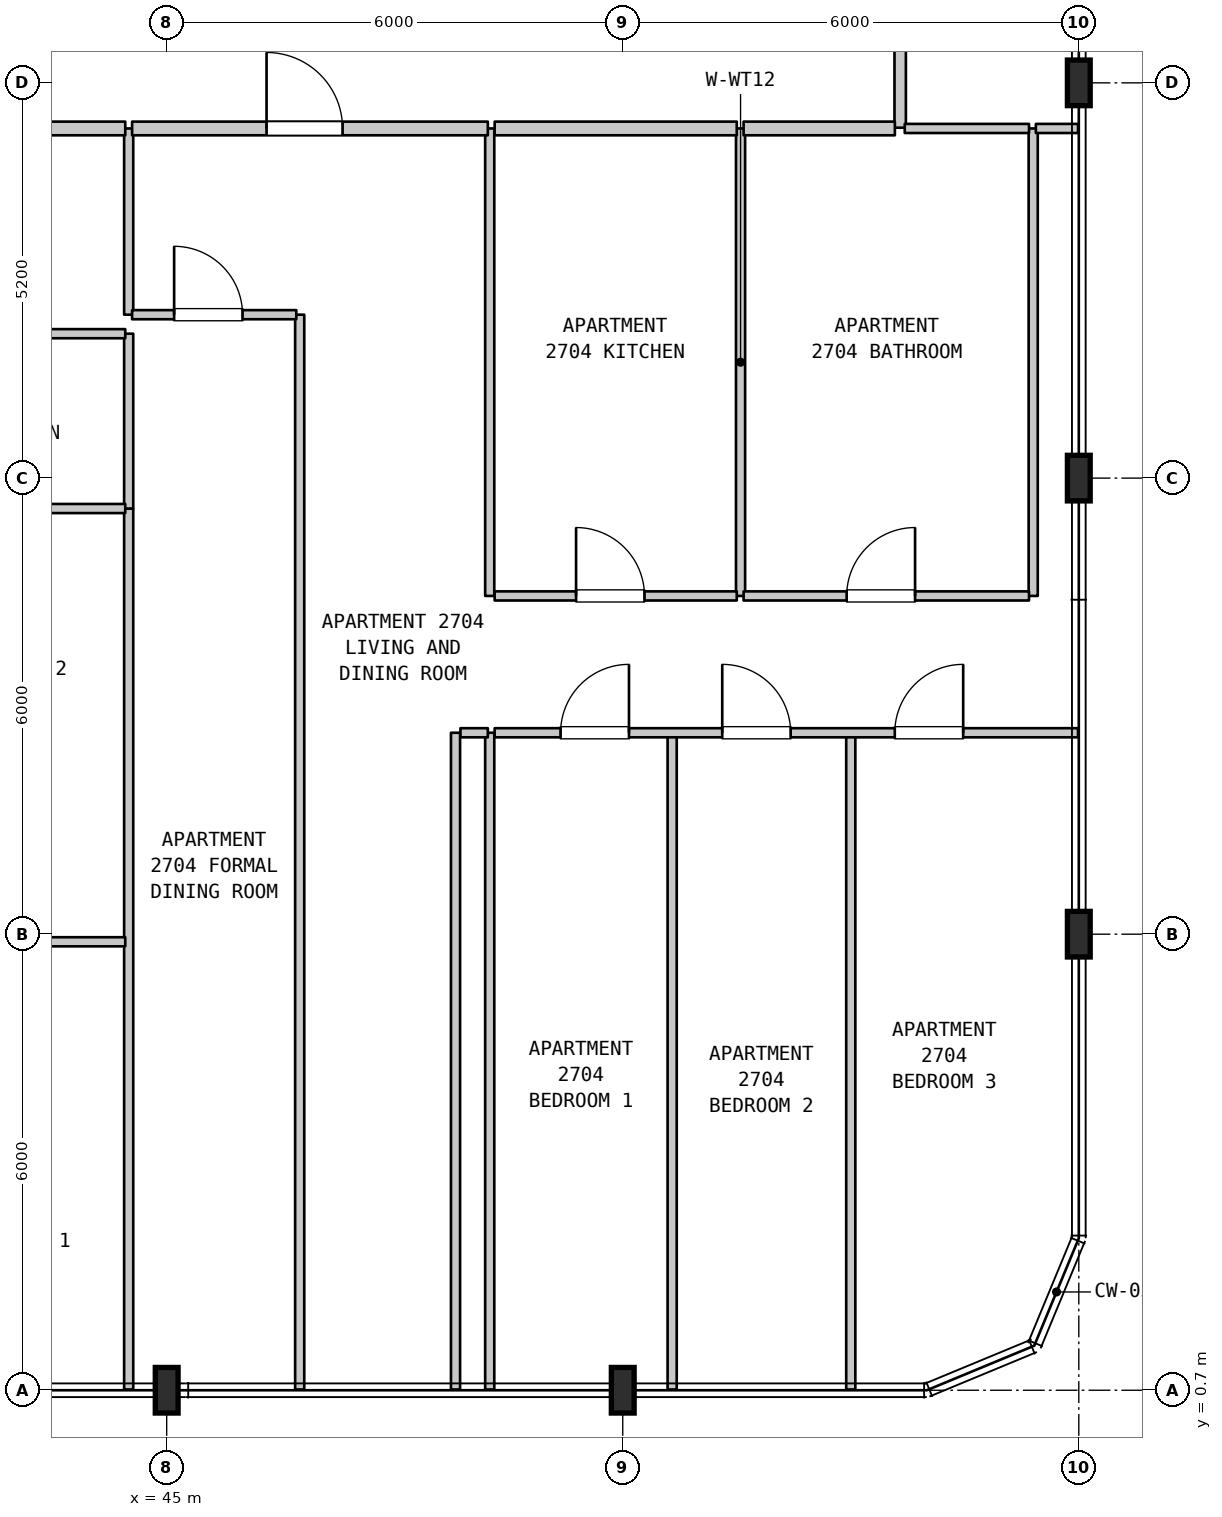
"""IFC4 building model, lengths in metres.
Left out: names, types, materials, properties, quantities, classifications, styles, units other than length and angle.
Written with IfcOpenShell. Run it as: python <this file> out.ifc"""

import sys

from ifc_helpers import new_model, si_unit, direction, frame, frame_2d, origin, origin_2d, place, context, subcontext, project, spatial, rectangle, i_section, extrude, element, fill, save


model = new_model("IFC4")
c1 = context("Model", 3, precision=1e-05, world=origin(), true_north=direction((0.0, 1.0)))
c2 = subcontext(c1, "Body", "Model", "MODEL_VIEW")
j1 = project(units=[si_unit("LENGTHUNIT", "METRE"), si_unit("PLANEANGLEUNIT", "RADIAN")], contexts=[c1])
p1 = place(None, origin())
s1 = spatial("IfcSite", under=j1, at=p1, CompositionType="ELEMENT")
p2 = place(p1, origin())
s2 = spatial("IfcBuilding", under=s1, at=p2, CompositionType="ELEMENT")
p3 = place(p2, frame((0.0, 0.0, 113.1)))
s3 = spatial("IfcBuildingStorey", under=s2, at=p3, CompositionType="ELEMENT", Elevation=113.1)
for number, where, z_axis, x_axis in (
    (1, (45.0, 0.7, 0.0), (0.0, 0.0, 1.0), (1.0, 0.0, 0.0)),
    (2, (51.0, 0.7, 0.0), (0.0, 0.0, 1.0), (1.0, 0.0, 0.0)),
    (3, (57.0, 6.7, 0.0), (0.0, 0.0, 1.0), (1.0, 0.0, 0.0)),
    (4, (57.0, 12.7, 0.0), (0.0, 0.0, 1.0), (1.0, 0.0, 0.0)),
    (5, (57.0, 17.9, 0.0), (0.0, 0.0, 1.0), (1.0, 0.0, 0.0)),
):
    element("IfcColumn", number, at=place(p3, frame(where, z_axis=z_axis, x_axis=x_axis)), inside=s3, PredefinedType="COLUMN", context=c2, shape_type="SweptSolid", body=[
        extrude(i_section(OverallWidth=0.3, OverallDepth=0.6, WebThickness=0.015, FlangeThickness=0.03, FilletRadius=0.027, at=origin_2d()), origin(), (0.0, 0.0, 1.0), 3.7),
    ])
p4 = place(p3, frame((44.5, 0.71, 0.0), z_axis=(0.0, 0.0, 1.0), x_axis=(0.0, 1.0, 0.0)))
e6 = element("IfcWall", 6, at=p4, inside=s3, PredefinedType="PARTITIONING", context=c2, shape_type="SweptSolid", body=[
    extrude(rectangle(XDim=11.59, YDim=0.12, at=frame_2d((5.795, 0.0))), origin(), (0.0, 0.0, 1.0), 3.385),
])
p5 = place(p3, frame((44.5, 12.3, 0.0), z_axis=(0.0, 0.0, 1.0), x_axis=(0.0, 1.0, 0.0)))
e7 = element("IfcWall", 7, at=p5, inside=s3, PredefinedType="PARTITIONING", context=c2, shape_type="SweptSolid", body=[
    extrude(rectangle(XDim=2.3, YDim=0.12, at=frame_2d((1.15, 0.0))), origin(), (0.0, 0.0, 1.0), 3.385),
])
p6 = place(p3, frame((44.5, 14.85, 0.0), z_axis=(0.0, 0.0, 1.0), x_axis=(0.0, 1.0, 0.0)))
e8 = element("IfcWall", 8, at=p6, inside=s3, PredefinedType="PARTITIONING", context=c2, shape_type="SweptSolid", body=[
    extrude(rectangle(XDim=2.45, YDim=0.12, at=frame_2d((1.225, 0.0))), origin(), (0.0, 0.0, 1.0), 3.385),
])
p7 = place(p3, frame((46.75, 0.71, 0.0), z_axis=(0.0, 0.0, 1.0), x_axis=(0.0, 1.0, 0.0)))
e9 = element("IfcWall", 9, at=p7, inside=s3, PredefinedType="PARTITIONING", context=c2, shape_type="SweptSolid", body=[
    extrude(rectangle(XDim=14.14, YDim=0.12, at=frame_2d((7.07, 0.0))), origin(), (0.0, 0.0, 1.0), 3.385),
])
for number, where, z_axis, x_axis in (
    (10, (48.8, 0.71, 0.0), (0.0, 0.0, 1.0), (0.0, 1.0, 0.0)),
    (11, (49.25, 0.71, 0.0), (0.0, 0.0, 1.0), (0.0, 1.0, 0.0)),
):
    element("IfcWall", number, at=place(p3, frame(where, z_axis=z_axis, x_axis=x_axis)), inside=s3, PredefinedType="PARTITIONING", context=c2, shape_type="SweptSolid", body=[
        extrude(rectangle(XDim=8.64, YDim=0.12, at=frame_2d((4.32, 0.0))), origin(), (0.0, 0.0, 1.0), 3.385),
    ])
p8 = place(p3, frame((49.25, 11.15, 0.0), z_axis=(0.0, 0.0, 1.0), x_axis=(0.0, 1.0, 0.0)))
e12 = element("IfcWall", 12, at=p8, inside=s3, PredefinedType="PARTITIONING", context=c2, shape_type="SweptSolid", body=[
    extrude(rectangle(XDim=6.15, YDim=0.12, at=frame_2d((3.075, 0.0))), origin(), (0.0, 0.0, 1.0), 3.385),
])
p9 = place(p3, frame((51.65, 0.71, 0.0), z_axis=(0.0, 0.0, 1.0), x_axis=(0.0, 1.0, 0.0)))
e13 = element("IfcWall", 13, at=p9, inside=s3, PredefinedType="PARTITIONING", context=c2, shape_type="SweptSolid", body=[
    extrude(rectangle(XDim=8.64, YDim=0.12, at=frame_2d((4.32, 0.0))), origin(), (0.0, 0.0, 1.0), 3.385),
])
p10 = place(p3, frame((52.55, 11.15, 0.0), z_axis=(0.0, 0.0, 1.0), x_axis=(0.0, 1.0, 0.0)))
e14 = element("IfcWall", 14, at=p10, inside=s3, PredefinedType="PARTITIONING", context=c2, shape_type="SweptSolid", body=[
    extrude(rectangle(XDim=6.15, YDim=0.12, at=frame_2d((3.075, 0.0))), origin(), (0.0, 0.0, 1.0), 3.385),
])
p11 = place(p3, frame((54.0, 0.71, 0.0), z_axis=(0.0, 0.0, 1.0), x_axis=(0.0, 1.0, 0.0)))
e15 = element("IfcWall", 15, at=p11, inside=s3, PredefinedType="PARTITIONING", context=c2, shape_type="SweptSolid", body=[
    extrude(rectangle(XDim=8.64, YDim=0.12, at=frame_2d((4.32, 0.0))), origin(), (0.0, 0.0, 1.0), 3.385),
])
p12 = place(p3, frame((54.65, 17.31, 0.0), z_axis=(0.0, 0.0, 1.0), x_axis=(0.0, 1.0, 0.0)))
e16 = element("IfcWall", 16, at=p12, inside=s3, PredefinedType="STANDARD", context=c2, shape_type="SweptSolid", body=[
    extrude(rectangle(XDim=2.19, YDim=0.15, at=frame_2d((1.095, 0.0))), origin(), (0.0, 0.0, 1.0), 3.385),
])
p13 = place(p3, frame((56.4, 11.15, 0.0), z_axis=(0.0, 0.0, 1.0), x_axis=(0.0, 1.0, 0.0)))
e17 = element("IfcWall", 17, at=p13, inside=s3, PredefinedType="PARTITIONING", context=c2, shape_type="SweptSolid", body=[
    extrude(rectangle(XDim=6.15, YDim=0.12, at=frame_2d((3.075, 0.0))), origin(), (0.0, 0.0, 1.0), 3.385),
])
p14 = place(p3, frame((40.295, 6.6, 0.0), z_axis=(0.0, 0.0, 1.0), x_axis=(1.0, 0.0, 0.0)))
e18 = element("IfcWall", 18, at=p14, inside=s3, PredefinedType="PARTITIONING", context=c2, shape_type="SweptSolid", body=[
    extrude(rectangle(XDim=4.16, YDim=0.12, at=frame_2d((2.08, 0.0))), origin(), (0.0, 0.0, 1.0), 2.785),
])
p15 = place(p3, frame((48.865, 9.35, 0.0), z_axis=(0.0, 0.0, 1.0), x_axis=(1.0, 0.0, 0.0)))
e19 = element("IfcWall", 19, at=p15, inside=s3, PredefinedType="PARTITIONING", context=c2, shape_type="SweptSolid", body=[
    extrude(rectangle(XDim=0.36, YDim=0.12, at=frame_2d((0.18, 0.0))), origin(), (0.0, 0.0, 1.0), 3.385),
])
p16 = place(p3, frame((49.315, 9.35, 0.0), z_axis=(0.0, 0.0, 1.0), x_axis=(1.0, 0.0, 0.0)))
e20 = element("IfcWall", 20, at=p16, inside=s3, PredefinedType="PARTITIONING", context=c2, shape_type="SweptSolid", body=[
    extrude(rectangle(XDim=7.675, YDim=0.12, at=frame_2d((3.837, 0.0))), origin(), (0.0, 0.0, 1.0), 3.385),
])
p17 = place(p16, frame((0.867, 0.0, 0.0)))
e21 = element("IfcOpeningElement", 21, at=p17, cuts=e20, PredefinedType="OPENING", context=c2, shape_type="SweptSolid", body=[
    extrude(rectangle(XDim=0.9, YDim=2.15, at=frame_2d((0.45, 1.075))), frame((0.0, 0.07, 0.0), z_axis=(0.0, -1.0, 0.0), x_axis=(1.0, 0.0, 0.0)), (0.0, 0.0, 1.0), 0.14),
])
p18 = place(p16, frame((2.994, 0.0, 0.0)))
e22 = element("IfcOpeningElement", 22, at=p18, cuts=e20, PredefinedType="OPENING", context=c2, shape_type="SweptSolid", body=[
    extrude(rectangle(XDim=0.9, YDim=2.15, at=frame_2d((0.45, 1.075))), frame((0.0, 0.07, 0.0), z_axis=(0.0, -1.0, 0.0), x_axis=(1.0, 0.0, 0.0)), (0.0, 0.0, 1.0), 0.14),
])
p19 = place(p16, frame((5.264, 0.0, 0.0)))
e23 = element("IfcOpeningElement", 23, at=p19, cuts=e20, PredefinedType="OPENING", context=c2, shape_type="SweptSolid", body=[
    extrude(rectangle(XDim=0.9, YDim=2.15, at=frame_2d((0.45, 1.075))), frame((0.0, 0.07, 0.0), z_axis=(0.0, -1.0, 0.0), x_axis=(1.0, 0.0, 0.0)), (0.0, 0.0, 1.0), 0.14),
])
p20 = place(p3, frame((49.315, 11.15, 0.0), z_axis=(0.0, 0.0, 1.0), x_axis=(1.0, 0.0, 0.0)))
e24 = element("IfcWall", 24, at=p20, inside=s3, PredefinedType="PARTITIONING", context=c2, shape_type="SweptSolid", body=[
    extrude(rectangle(XDim=3.185, YDim=0.12, at=frame_2d((1.593, 0.0))), origin(), (0.0, 0.0, 1.0), 3.385),
])
p21 = place(p20, frame((1.071, 0.0, 0.0)))
e25 = element("IfcOpeningElement", 25, at=p21, cuts=e24, PredefinedType="OPENING", context=c2, shape_type="SweptSolid", body=[
    extrude(rectangle(XDim=0.9, YDim=2.15, at=frame_2d((0.45, 1.075))), frame((0.0, 0.07, 0.0), z_axis=(0.0, -1.0, 0.0), x_axis=(1.0, 0.0, 0.0)), (0.0, 0.0, 1.0), 0.14),
])
p22 = place(p3, frame((52.59, 11.15, 0.0), z_axis=(0.0, 0.0, 1.0), x_axis=(1.0, 0.0, 0.0)))
e26 = element("IfcWall", 26, at=p22, inside=s3, PredefinedType="PARTITIONING", context=c2, shape_type="SweptSolid", body=[
    extrude(rectangle(XDim=3.755, YDim=0.12, at=frame_2d((1.877, 0.0))), origin(), (0.0, 0.0, 1.0), 3.385),
])
p23 = place(p22, frame((1.356, 0.0, 0.0)))
e27 = element("IfcOpeningElement", 27, at=p23, cuts=e26, PredefinedType="OPENING", context=c2, shape_type="SweptSolid", body=[
    extrude(rectangle(XDim=0.9, YDim=2.1, at=frame_2d((0.45, 1.05))), frame((0.0, 0.07, 0.0), z_axis=(0.0, -1.0, 0.0), x_axis=(1.0, 0.0, 0.0)), (0.0, 0.0, 1.0), 0.14),
])
for number, where, z_axis, x_axis in (
    (28, (40.295, 12.3, 0.0), (0.0, 0.0, 1.0), (1.0, 0.0, 0.0)),
    (29, (40.295, 14.6, 0.0), (0.0, 0.0, 1.0), (1.0, 0.0, 0.0)),
):
    element("IfcWall", number, at=place(p3, frame(where, z_axis=z_axis, x_axis=x_axis)), inside=s3, PredefinedType="PARTITIONING", context=c2, shape_type="SweptSolid", body=[
        extrude(rectangle(XDim=4.16, YDim=0.12, at=frame_2d((2.08, 0.0))), origin(), (0.0, 0.0, 1.0), 3.385),
    ])
p24 = place(p3, frame((44.545, 14.85, 0.0), z_axis=(0.0, 0.0, 1.0), x_axis=(1.0, 0.0, 0.0)))
e30 = element("IfcWall", 30, at=p24, inside=s3, PredefinedType="PARTITIONING", context=c2, shape_type="SweptSolid", body=[
    extrude(rectangle(XDim=2.16, YDim=0.12, at=frame_2d((1.08, 0.0))), origin(), (0.0, 0.0, 1.0), 3.385),
])
p25 = place(p24, frame((0.553, 0.0, 0.0)))
e31 = element("IfcOpeningElement", 31, at=p25, cuts=e30, PredefinedType="OPENING", context=c2, shape_type="SweptSolid", body=[
    extrude(rectangle(XDim=0.9, YDim=2.15, at=frame_2d((0.45, 1.075))), frame((0.0, 0.07, 0.0), z_axis=(0.0, -1.0, 0.0), x_axis=(1.0, 0.0, 0.0)), (0.0, 0.0, 1.0), 0.14),
])
p26 = place(p3, frame((40.295, 17.3, 0.0), z_axis=(0.0, 0.0, 1.0), x_axis=(1.0, 0.0, 0.0)))
e32 = element("IfcWall", 32, at=p26, inside=s3, PredefinedType="STANDARD", context=c2, shape_type="SweptSolid", body=[
    extrude(rectangle(XDim=4.16, YDim=0.18, at=frame_2d((2.08, 0.0))), origin(), (0.0, 0.0, 1.0), 3.385),
])
p27 = place(p3, frame((44.545, 17.3, 0.0), z_axis=(0.0, 0.0, 1.0), x_axis=(1.0, 0.0, 0.0)))
e33 = element("IfcWall", 33, at=p27, inside=s3, PredefinedType="STANDARD", context=c2, shape_type="SweptSolid", body=[
    extrude(rectangle(XDim=4.68, YDim=0.18, at=frame_2d((2.34, 0.0))), origin(), (0.0, 0.0, 1.0), 3.385),
])
p28 = place(p27, frame((1.769, 0.0, 0.0)))
e34 = element("IfcOpeningElement", 34, at=p28, cuts=e33, PredefinedType="OPENING", context=c2, shape_type="SweptSolid", body=[
    extrude(rectangle(XDim=1.0, YDim=2.15, at=frame_2d((0.5, 1.075))), frame((0.0, 0.1, 0.0), z_axis=(0.0, -1.0, 0.0), x_axis=(1.0, 0.0, 0.0)), (0.0, 0.0, 1.0), 0.2),
])
p29 = place(p3, frame((49.315, 17.3, 0.0), z_axis=(0.0, 0.0, 1.0), x_axis=(1.0, 0.0, 0.0)))
e35 = element("IfcWall", 35, at=p29, inside=s3, PredefinedType="STANDARD", context=c2, shape_type="SweptSolid", body=[
    extrude(rectangle(XDim=3.185, YDim=0.18, at=frame_2d((1.593, 0.0))), origin(), (0.0, 0.0, 1.0), 3.385),
])
p30 = place(p3, frame((52.59, 17.3, 0.0), z_axis=(0.0, 0.0, 1.0), x_axis=(1.0, 0.0, 0.0)))
e36 = element("IfcWall", 36, at=p30, inside=s3, PredefinedType="STANDARD", context=c2, shape_type="SweptSolid", body=[
    extrude(rectangle(XDim=1.99, YDim=0.18, at=frame_2d((0.995, 0.0))), origin(), (0.0, 0.0, 1.0), 3.385),
])
p31 = place(p3, frame((54.71, 17.3, 0.0), z_axis=(0.0, 0.0, 1.0), x_axis=(1.0, 0.0, 0.0)))
e37 = element("IfcWall", 37, at=p31, inside=s3, PredefinedType="PARTITIONING", context=c2, shape_type="SweptSolid", body=[
    extrude(rectangle(XDim=1.635, YDim=0.12, at=frame_2d((0.817, 0.0))), origin(), (0.0, 0.0, 1.0), 3.385),
])
p32 = place(p3, frame((56.435, 17.3, 0.0), z_axis=(0.0, 0.0, 1.0), x_axis=(1.0, 0.0, 0.0)))
e38 = element("IfcWall", 38, at=p32, inside=s3, PredefinedType="PARTITIONING", context=c2, shape_type="SweptSolid", body=[
    extrude(rectangle(XDim=0.555, YDim=0.12, at=frame_2d((0.277, 0.0))), origin(), (0.0, 0.0, 1.0), 3.385),
])
p33 = place(p17, origin())
e39 = element("IfcDoor", 39, at=p33, inside=s3, OperationType="SINGLE_SWING_RIGHT", PredefinedType="DOOR", context=c2, shape_type="SweptSolid", body=[
    extrude(rectangle(XDim=0.9, YDim=2.15, at=frame_2d((0.45, 1.075))), frame((0.0, 0.025, 0.0), z_axis=(0.0, -1.0, 0.0), x_axis=(1.0, 0.0, 0.0)), (0.0, 0.0, 1.0), 0.05),
])
fill(e21, e39)
p34 = place(p18, origin())
e40 = element("IfcDoor", 40, at=p34, inside=s3, OperationType="SINGLE_SWING_LEFT", PredefinedType="DOOR", context=c2, shape_type="SweptSolid", body=[
    extrude(rectangle(XDim=0.9, YDim=2.15, at=frame_2d((0.45, 1.075))), frame((0.0, 0.025, 0.0), z_axis=(0.0, -1.0, 0.0), x_axis=(1.0, 0.0, 0.0)), (0.0, 0.0, 1.0), 0.05),
])
fill(e22, e40)
p35 = place(p19, origin())
e41 = element("IfcDoor", 41, at=p35, inside=s3, OperationType="SINGLE_SWING_RIGHT", PredefinedType="DOOR", context=c2, shape_type="SweptSolid", body=[
    extrude(rectangle(XDim=0.9, YDim=2.15, at=frame_2d((0.45, 1.075))), frame((0.0, 0.025, 0.0), z_axis=(0.0, -1.0, 0.0), x_axis=(1.0, 0.0, 0.0)), (0.0, 0.0, 1.0), 0.05),
])
fill(e23, e41)
p36 = place(p21, origin())
e42 = element("IfcDoor", 42, at=p36, inside=s3, OperationType="SINGLE_SWING_LEFT", PredefinedType="DOOR", context=c2, shape_type="SweptSolid", body=[
    extrude(rectangle(XDim=0.9, YDim=2.15, at=frame_2d((0.45, 1.075))), frame((0.0, 0.025, 0.0), z_axis=(0.0, -1.0, 0.0), x_axis=(1.0, 0.0, 0.0)), (0.0, 0.0, 1.0), 0.05),
])
fill(e25, e42)
p37 = place(p23, origin())
e43 = element("IfcDoor", 43, at=p37, inside=s3, OperationType="SINGLE_SWING_RIGHT", PredefinedType="DOOR", context=c2, shape_type="SweptSolid", body=[
    extrude(rectangle(XDim=0.9, YDim=2.1, at=frame_2d((0.45, 1.05))), frame((0.0, 0.025, 0.0), z_axis=(0.0, -1.0, 0.0), x_axis=(1.0, 0.0, 0.0)), (0.0, 0.0, 1.0), 0.05),
])
fill(e27, e43)
p38 = place(p25, origin())
e44 = element("IfcDoor", 44, at=p38, inside=s3, OperationType="SINGLE_SWING_LEFT", PredefinedType="DOOR", context=c2, shape_type="SweptSolid", body=[
    extrude(rectangle(XDim=0.9, YDim=2.15, at=frame_2d((0.45, 1.075))), frame((0.0, 0.025, 0.0), z_axis=(0.0, -1.0, 0.0), x_axis=(1.0, 0.0, 0.0)), (0.0, 0.0, 1.0), 0.05),
])
fill(e31, e44)
p39 = place(p28, origin())
e45 = element("IfcDoor", 45, at=p39, inside=s3, OperationType="SINGLE_SWING_LEFT", PredefinedType="DOOR", context=c2, shape_type="SweptSolid", body=[
    extrude(rectangle(XDim=1.0, YDim=2.15, at=frame_2d((0.5, 1.075))), frame((0.0, 0.025, 0.0), z_axis=(0.0, -1.0, 0.0), x_axis=(1.0, 0.0, 0.0)), (0.0, 0.0, 1.0), 0.05),
])
fill(e34, e45)
save(model, sys.argv[1])
